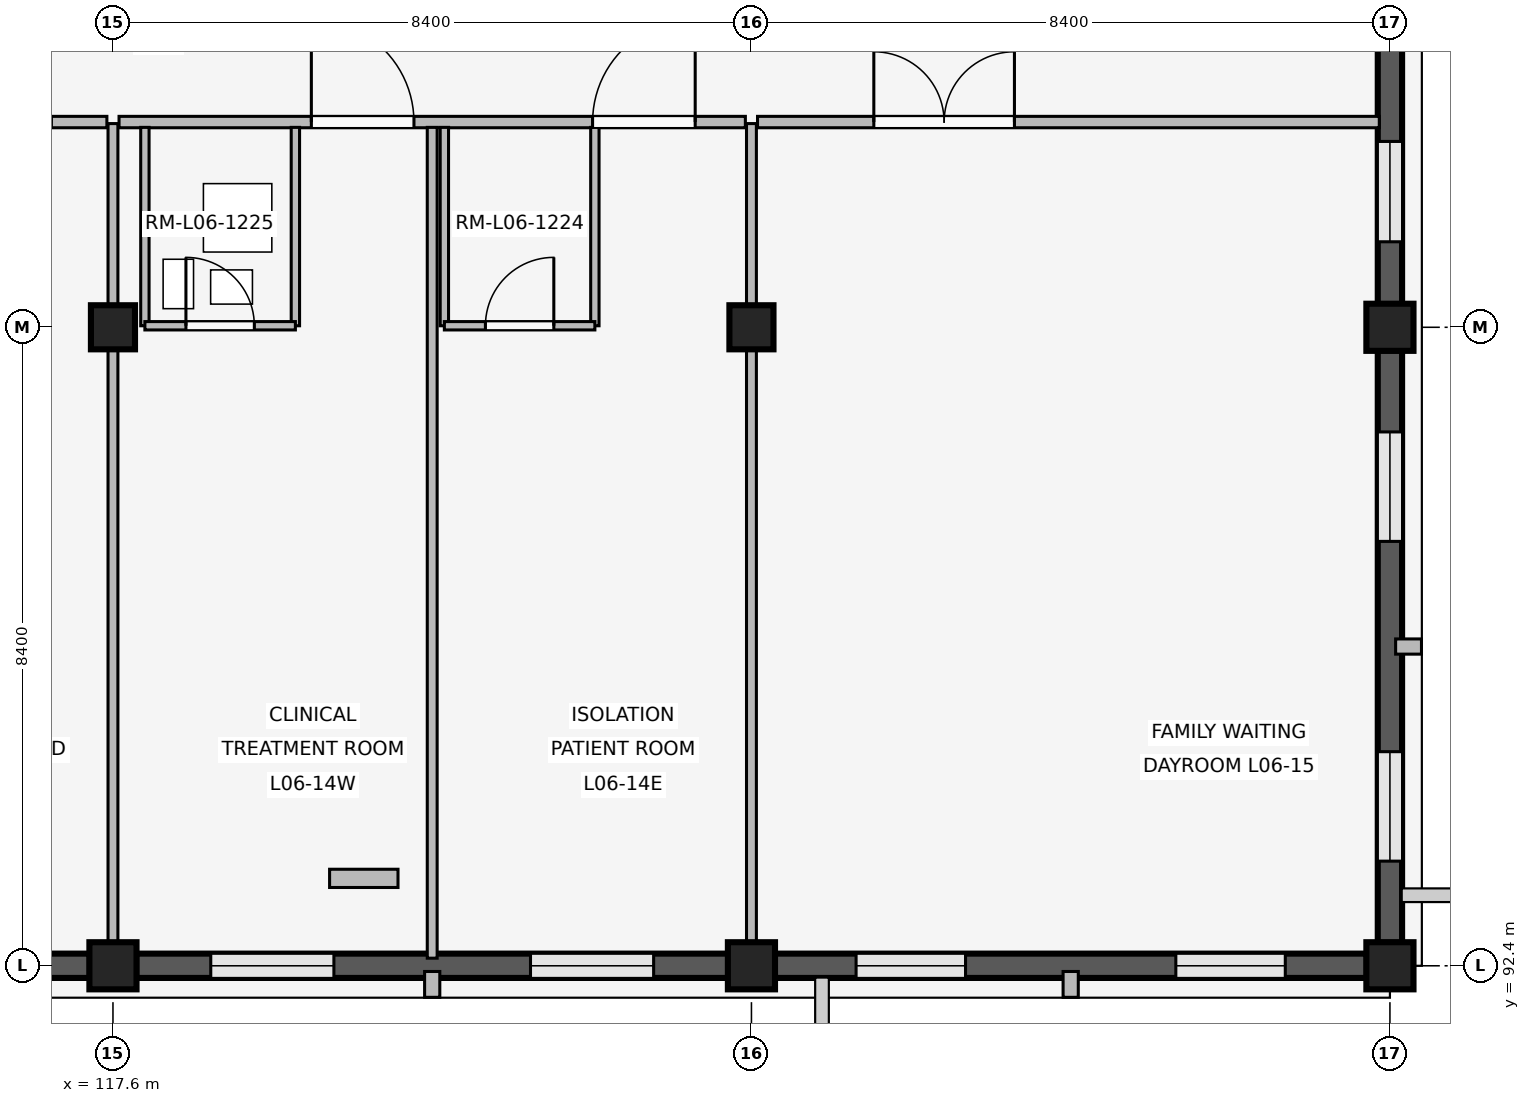
"""IFC4 building model, lengths in metres.
Left out: names, types, materials, properties, quantities, classifications, styles, units other than length and angle.
Written with IfcOpenShell. Run it as: python <this file> out.ifc"""

import sys

from ifc_helpers import new_model, si_unit, direction, frame, frame_2d, origin, origin_2d, place, context, subcontext, project, spatial, rectangle, extrude, element, fill, save


model = new_model("IFC4")
c1 = context("Model", 3, precision=1e-05, world=origin(), true_north=direction((0.0, 1.0)))
c2 = subcontext(c1, "Body", "Model", "MODEL_VIEW")
j1 = project(units=[si_unit("LENGTHUNIT", "METRE"), si_unit("PLANEANGLEUNIT", "RADIAN")], contexts=[c1])
p1 = place(None, origin())
s1 = spatial("IfcSite", under=j1, at=p1, CompositionType="ELEMENT")
p2 = place(p1, origin())
s2 = spatial("IfcBuilding", under=s1, at=p2, CompositionType="ELEMENT")
p3 = place(p2, frame((0.0, 0.0, 24.6)))
s3 = spatial("IfcBuildingStorey", under=s2, at=p3, CompositionType="ELEMENT", Elevation=24.6)
p4 = place(p3, frame((117.6, 92.4, 0.0), z_axis=(0.0, 0.0, 1.0), x_axis=(1.0, 0.0, 0.0)))
e1 = element("IfcColumn", 1, at=p4, inside=s3, PredefinedType="COLUMN", context=c2, shape_type="SweptSolid", body=[
    extrude(rectangle(XDim=0.62, YDim=0.62, at=origin_2d()), origin(), (0.0, 0.0, 1.0), 4.2),
])
p5 = place(p3, frame((117.6, 100.8, 0.0), z_axis=(0.0, 0.0, 1.0), x_axis=(1.0, 0.0, 0.0)))
e2 = element("IfcColumn", 2, at=p5, inside=s3, PredefinedType="COLUMN", context=c2, shape_type="SweptSolid", body=[
    extrude(rectangle(XDim=0.58, YDim=0.58, at=origin_2d()), origin(), (0.0, 0.0, 1.0), 4.2),
])
p6 = place(p3, frame((126.0, 92.4, 0.0), z_axis=(0.0, 0.0, 1.0), x_axis=(1.0, 0.0, 0.0)))
e3 = element("IfcColumn", 3, at=p6, inside=s3, PredefinedType="COLUMN", context=c2, shape_type="SweptSolid", body=[
    extrude(rectangle(XDim=0.62, YDim=0.62, at=origin_2d()), origin(), (0.0, 0.0, 1.0), 4.2),
])
p7 = place(p3, frame((126.0, 100.8, 0.0), z_axis=(0.0, 0.0, 1.0), x_axis=(1.0, 0.0, 0.0)))
e4 = element("IfcColumn", 4, at=p7, inside=s3, PredefinedType="COLUMN", context=c2, shape_type="SweptSolid", body=[
    extrude(rectangle(XDim=0.58, YDim=0.58, at=origin_2d()), origin(), (0.0, 0.0, 1.0), 4.2),
])
for number, where, z_axis, x_axis in (
    (5, (134.4, 92.4, 0.0), (0.0, 0.0, 1.0), (1.0, 0.0, 0.0)),
    (6, (134.4, 100.8, 0.0), (0.0, 0.0, 1.0), (1.0, 0.0, 0.0)),
):
    element("IfcColumn", number, at=place(p3, frame(where, z_axis=z_axis, x_axis=x_axis)), inside=s3, PredefinedType="COLUMN", context=c2, shape_type="SweptSolid", body=[
        extrude(rectangle(XDim=0.62, YDim=0.62, at=origin_2d()), origin(), (0.0, 0.0, 1.0), 4.2),
    ])
p8 = place(p3, frame((117.295, 92.4, 0.0), z_axis=(0.0, 0.0, 1.0), x_axis=(-1.0, 0.0, 0.0)))
e7 = element("IfcWall", 7, at=p8, inside=s3, PredefinedType="SOLIDWALL", context=c2, shape_type="SweptSolid", body=[
    extrude(rectangle(XDim=7.79, YDim=0.32, at=frame_2d((3.895, 0.0))), origin(), (0.0, 0.0, 1.0), 3.34),
])
p9 = place(p8, frame((1.012, 0.0, 0.85)))
e8 = element("IfcOpeningElement", 8, at=p9, cuts=e7, PredefinedType="OPENING", context=c2, shape_type="SweptSolid", body=[
    extrude(rectangle(XDim=1.56, YDim=1.7, at=frame_2d((0.78, 0.85))), frame((0.0, 0.17, 0.0), z_axis=(0.0, -1.0, 0.0), x_axis=(1.0, 0.0, 0.0)), (0.0, 0.0, 1.0), 0.34),
])
p10 = place(p8, frame((5.218, 0.0, 0.85)))
e9 = element("IfcOpeningElement", 9, at=p10, cuts=e7, PredefinedType="OPENING", context=c2, shape_type="SweptSolid", body=[
    extrude(rectangle(XDim=1.56, YDim=1.7, at=frame_2d((0.78, 0.85))), frame((0.0, 0.17, 0.0), z_axis=(0.0, -1.0, 0.0), x_axis=(1.0, 0.0, 0.0)), (0.0, 0.0, 1.0), 0.34),
])
p11 = place(p3, frame((125.695, 92.4, 0.0), z_axis=(0.0, 0.0, 1.0), x_axis=(-1.0, 0.0, 0.0)))
e10 = element("IfcWall", 10, at=p11, inside=s3, PredefinedType="SOLIDWALL", context=c2, shape_type="SweptSolid", body=[
    extrude(rectangle(XDim=7.79, YDim=0.32, at=frame_2d((3.895, 0.0))), origin(), (0.0, 0.0, 1.0), 3.34),
])
p12 = place(p11, frame((0.982, 0.0, 0.85)))
e11 = element("IfcOpeningElement", 11, at=p12, cuts=e10, PredefinedType="OPENING", context=c2, shape_type="SweptSolid", body=[
    extrude(rectangle(XDim=1.62, YDim=1.8, at=frame_2d((0.81, 0.9))), frame((0.0, 0.17, 0.0), z_axis=(0.0, -1.0, 0.0), x_axis=(1.0, 0.0, 0.0)), (0.0, 0.0, 1.0), 0.34),
])
p13 = place(p11, frame((5.188, 0.0, 0.85)))
e12 = element("IfcOpeningElement", 12, at=p13, cuts=e10, PredefinedType="OPENING", context=c2, shape_type="SweptSolid", body=[
    extrude(rectangle(XDim=1.62, YDim=1.8, at=frame_2d((0.81, 0.9))), frame((0.0, 0.17, 0.0), z_axis=(0.0, -1.0, 0.0), x_axis=(1.0, 0.0, 0.0)), (0.0, 0.0, 1.0), 0.34),
])
p14 = place(p3, frame((121.8, 92.325, 0.0), z_axis=(0.0, 0.0, 1.0), x_axis=(0.0, -1.0, 0.0)))
e13 = element("IfcWall", 13, at=p14, inside=s3, PredefinedType="ELEMENTEDWALL", context=c2, shape_type="SweptSolid", body=[
    extrude(rectangle(XDim=0.34, YDim=0.2, at=frame_2d((0.17, 0.0))), origin(), (0.0, 0.0, 1.0), 3.32),
])
p15 = place(p3, frame((134.095, 92.4, 0.0), z_axis=(0.0, 0.0, 1.0), x_axis=(-1.0, 0.0, 0.0)))
e14 = element("IfcWall", 14, at=p15, inside=s3, PredefinedType="SOLIDWALL", context=c2, shape_type="SweptSolid", body=[
    extrude(rectangle(XDim=7.79, YDim=0.32, at=frame_2d((3.895, 0.0))), origin(), (0.0, 0.0, 1.0), 3.34),
])
p16 = place(p15, frame((1.072, 0.0, 0.85)))
e15 = element("IfcOpeningElement", 15, at=p16, cuts=e14, PredefinedType="OPENING", context=c2, shape_type="SweptSolid", body=[
    extrude(rectangle(XDim=1.44, YDim=1.62, at=frame_2d((0.72, 0.81))), frame((0.0, 0.17, 0.0), z_axis=(0.0, -1.0, 0.0), x_axis=(1.0, 0.0, 0.0)), (0.0, 0.0, 1.0), 0.34),
])
p17 = place(p15, frame((5.278, 0.0, 0.85)))
e16 = element("IfcOpeningElement", 16, at=p17, cuts=e14, PredefinedType="OPENING", context=c2, shape_type="SweptSolid", body=[
    extrude(rectangle(XDim=1.44, YDim=1.62, at=frame_2d((0.72, 0.81))), frame((0.0, 0.17, 0.0), z_axis=(0.0, -1.0, 0.0), x_axis=(1.0, 0.0, 0.0)), (0.0, 0.0, 1.0), 0.34),
])
p18 = place(p3, frame((130.2, 92.325, 0.0), z_axis=(0.0, 0.0, 1.0), x_axis=(0.0, -1.0, 0.0)))
e17 = element("IfcWall", 17, at=p18, inside=s3, PredefinedType="ELEMENTEDWALL", context=c2, shape_type="SweptSolid", body=[
    extrude(rectangle(XDim=0.34, YDim=0.2, at=frame_2d((0.17, 0.0))), origin(), (0.0, 0.0, 1.0), 3.32),
])
p19 = place(p3, frame((134.4, 100.495, 0.0), z_axis=(0.0, 0.0, 1.0), x_axis=(0.0, -1.0, 0.0)))
e18 = element("IfcWall", 18, at=p19, inside=s3, PredefinedType="SOLIDWALL", context=c2, shape_type="SweptSolid", body=[
    extrude(rectangle(XDim=7.79, YDim=0.32, at=frame_2d((3.895, 0.0))), origin(), (0.0, 0.0, 1.0), 3.34),
])
p20 = place(p19, frame((1.072, 0.0, 0.85)))
e19 = element("IfcOpeningElement", 19, at=p20, cuts=e18, PredefinedType="OPENING", context=c2, shape_type="SweptSolid", body=[
    extrude(rectangle(XDim=1.44, YDim=1.62, at=frame_2d((0.72, 0.81))), frame((0.0, 0.17, 0.0), z_axis=(0.0, -1.0, 0.0), x_axis=(1.0, 0.0, 0.0)), (0.0, 0.0, 1.0), 0.34),
])
p21 = place(p19, frame((5.278, 0.0, 0.85)))
e20 = element("IfcOpeningElement", 20, at=p21, cuts=e18, PredefinedType="OPENING", context=c2, shape_type="SweptSolid", body=[
    extrude(rectangle(XDim=1.44, YDim=1.62, at=frame_2d((0.72, 0.81))), frame((0.0, 0.17, 0.0), z_axis=(0.0, -1.0, 0.0), x_axis=(1.0, 0.0, 0.0)), (0.0, 0.0, 1.0), 0.34),
])
p22 = place(p3, frame((134.475, 96.6, 0.0), z_axis=(0.0, 0.0, 1.0), x_axis=(1.0, 0.0, 0.0)))
e21 = element("IfcWall", 21, at=p22, inside=s3, PredefinedType="ELEMENTEDWALL", context=c2, shape_type="SweptSolid", body=[
    extrude(rectangle(XDim=0.34, YDim=0.2, at=frame_2d((0.17, 0.0))), origin(), (0.0, 0.0, 1.0), 3.32),
])
p23 = place(p3, frame((134.4, 108.895, 0.0), z_axis=(0.0, 0.0, 1.0), x_axis=(0.0, -1.0, 0.0)))
e22 = element("IfcWall", 22, at=p23, inside=s3, PredefinedType="SOLIDWALL", context=c2, shape_type="SweptSolid", body=[
    extrude(rectangle(XDim=7.79, YDim=0.32, at=frame_2d((3.895, 0.0))), origin(), (0.0, 0.0, 1.0), 3.34),
])
p24 = place(p23, frame((0.82, 0.0, 0.85)))
e23 = element("IfcOpeningElement", 23, at=p24, cuts=e22, PredefinedType="OPENING", context=c2, shape_type="SweptSolid", body=[
    extrude(rectangle(XDim=1.32, YDim=1.58, at=frame_2d((0.66, 0.79))), frame((0.0, 0.17, 0.0), z_axis=(0.0, -1.0, 0.0), x_axis=(1.0, 0.0, 0.0)), (0.0, 0.0, 1.0), 0.34),
])
p25 = place(p23, frame((5.65, 0.0, 0.85)))
e24 = element("IfcOpeningElement", 24, at=p25, cuts=e22, PredefinedType="OPENING", context=c2, shape_type="SweptSolid", body=[
    extrude(rectangle(XDim=1.32, YDim=1.58, at=frame_2d((0.66, 0.79))), frame((0.0, 0.17, 0.0), z_axis=(0.0, -1.0, 0.0), x_axis=(1.0, 0.0, 0.0)), (0.0, 0.0, 1.0), 0.34),
])
p26 = place(p3, frame((109.28, 103.5, 0.0), z_axis=(0.0, 0.0, 1.0), x_axis=(1.0, 0.0, 0.0)))
e25 = element("IfcWall", 25, at=p26, inside=s3, PredefinedType="PARTITIONING", context=c2, shape_type="SweptSolid", body=[
    extrude(rectangle(XDim=8.24, YDim=0.15, at=frame_2d((4.12, 0.0))), origin(), (0.0, 0.0, 1.0), 3.32),
])
p27 = place(p26, frame((2.53, 0.0, 0.0)))
e26 = element("IfcOpeningElement", 26, at=p27, cuts=e25, PredefinedType="OPENING", context=c2, shape_type="SweptSolid", body=[
    extrude(rectangle(XDim=1.28, YDim=2.2, at=frame_2d((0.64, 1.1))), frame((0.0, 0.085, 0.0), z_axis=(0.0, -1.0, 0.0), x_axis=(1.0, 0.0, 0.0)), (0.0, 0.0, 1.0), 0.17),
])
p28 = place(p26, frame((6.23, 0.0, 0.0)))
e27 = element("IfcOpeningElement", 27, at=p28, cuts=e25, PredefinedType="OPENING", context=c2, shape_type="SweptSolid", body=[
    extrude(rectangle(XDim=1.28, YDim=2.2, at=frame_2d((0.64, 1.1))), frame((0.0, 0.085, 0.0), z_axis=(0.0, -1.0, 0.0), x_axis=(1.0, 0.0, 0.0)), (0.0, 0.0, 1.0), 0.17),
])
p29 = place(p3, frame((117.6, 92.54, 0.0), z_axis=(0.0, 0.0, 1.0), x_axis=(0.0, 1.0, 0.0)))
e28 = element("IfcWall", 28, at=p29, inside=s3, PredefinedType="PARTITIONING", context=c2, shape_type="SweptSolid", body=[
    extrude(rectangle(XDim=10.94, YDim=0.13, at=frame_2d((5.47, 0.0))), origin(), (0.0, 0.0, 1.0), 3.32),
])
p30 = place(p3, frame((117.68, 103.5, 0.0), z_axis=(0.0, 0.0, 1.0), x_axis=(1.0, 0.0, 0.0)))
e29 = element("IfcWall", 29, at=p30, inside=s3, PredefinedType="PARTITIONING", context=c2, shape_type="SweptSolid", body=[
    extrude(rectangle(XDim=8.24, YDim=0.15, at=frame_2d((4.12, 0.0))), origin(), (0.0, 0.0, 1.0), 3.32),
])
p31 = place(p30, frame((2.53, 0.0, 0.0)))
e30 = element("IfcOpeningElement", 30, at=p31, cuts=e29, PredefinedType="OPENING", context=c2, shape_type="SweptSolid", body=[
    extrude(rectangle(XDim=1.35, YDim=2.25, at=frame_2d((0.675, 1.125))), frame((0.0, 0.085, 0.0), z_axis=(0.0, -1.0, 0.0), x_axis=(1.0, 0.0, 0.0)), (0.0, 0.0, 1.0), 0.17),
])
p32 = place(p30, frame((6.23, 0.0, 0.0)))
e31 = element("IfcOpeningElement", 31, at=p32, cuts=e29, PredefinedType="OPENING", context=c2, shape_type="SweptSolid", body=[
    extrude(rectangle(XDim=1.35, YDim=2.25, at=frame_2d((0.675, 1.125))), frame((0.0, 0.085, 0.0), z_axis=(0.0, -1.0, 0.0), x_axis=(1.0, 0.0, 0.0)), (0.0, 0.0, 1.0), 0.17),
])
p33 = place(p3, frame((121.8, 92.5, 0.0), z_axis=(0.0, 0.0, 1.0), x_axis=(0.0, 1.0, 0.0)))
e32 = element("IfcWall", 32, at=p33, inside=s3, PredefinedType="PARTITIONING", context=c2, shape_type="SweptSolid", body=[
    extrude(rectangle(XDim=10.93, YDim=0.13, at=frame_2d((5.465, 0.0))), origin(), (0.0, 0.0, 1.0), 3.32),
])
for number, where, z_axis, x_axis in (
    (33, (118.02, 100.82, 0.0), (0.0, 0.0, 1.0), (0.0, 1.0, 0.0)),
    (34, (120.0, 100.82, 0.0), (0.0, 0.0, 1.0), (0.0, 1.0, 0.0)),
):
    element("IfcWall", number, at=place(p3, frame(where, z_axis=z_axis, x_axis=x_axis)), inside=s3, PredefinedType="PARTITIONING", context=c2, shape_type="SweptSolid", body=[
        extrude(rectangle(XDim=2.61, YDim=0.11, at=frame_2d((1.305, 0.0))), origin(), (0.0, 0.0, 1.0), 3.32),
    ])
p34 = place(p3, frame((118.02, 100.82, 0.0), z_axis=(0.0, 0.0, 1.0), x_axis=(1.0, 0.0, 0.0)))
e35 = element("IfcWall", 35, at=p34, inside=s3, PredefinedType="PARTITIONING", context=c2, shape_type="SweptSolid", body=[
    extrude(rectangle(XDim=1.98, YDim=0.11, at=frame_2d((0.99, 0.0))), origin(), (0.0, 0.0, 1.0), 3.32),
])
p35 = place(p34, frame((0.54, 0.0, 0.0)))
e36 = element("IfcOpeningElement", 36, at=p35, cuts=e35, PredefinedType="OPENING", context=c2, shape_type="SweptSolid", body=[
    extrude(rectangle(XDim=0.9, YDim=2.1, at=frame_2d((0.45, 1.05))), frame((0.0, 0.065, 0.0), z_axis=(0.0, -1.0, 0.0), x_axis=(1.0, 0.0, 0.0)), (0.0, 0.0, 1.0), 0.13),
])
for number, where, z_axis, x_axis in (
    (37, (121.96, 100.82, 0.0), (0.0, 0.0, 1.0), (0.0, 1.0, 0.0)),
    (38, (123.94, 100.82, 0.0), (0.0, 0.0, 1.0), (0.0, 1.0, 0.0)),
):
    element("IfcWall", number, at=place(p3, frame(where, z_axis=z_axis, x_axis=x_axis)), inside=s3, PredefinedType="PARTITIONING", context=c2, shape_type="SweptSolid", body=[
        extrude(rectangle(XDim=2.61, YDim=0.11, at=frame_2d((1.305, 0.0))), origin(), (0.0, 0.0, 1.0), 3.32),
    ])
p36 = place(p3, frame((121.96, 100.82, 0.0), z_axis=(0.0, 0.0, 1.0), x_axis=(1.0, 0.0, 0.0)))
e39 = element("IfcWall", 39, at=p36, inside=s3, PredefinedType="PARTITIONING", context=c2, shape_type="SweptSolid", body=[
    extrude(rectangle(XDim=1.98, YDim=0.11, at=frame_2d((0.99, 0.0))), origin(), (0.0, 0.0, 1.0), 3.32),
])
p37 = place(p36, frame((0.54, 0.0, 0.0)))
e40 = element("IfcOpeningElement", 40, at=p37, cuts=e39, PredefinedType="OPENING", context=c2, shape_type="SweptSolid", body=[
    extrude(rectangle(XDim=0.9, YDim=2.1, at=frame_2d((0.45, 1.05))), frame((0.0, 0.065, 0.0), z_axis=(0.0, -1.0, 0.0), x_axis=(1.0, 0.0, 0.0)), (0.0, 0.0, 1.0), 0.13),
])
p38 = place(p3, frame((120.45, 93.55, 0.0), z_axis=(0.0, 0.0, 1.0), x_axis=(1.0, 0.0, 0.0)))
e41 = element("IfcWall", 41, at=p38, inside=s3, PredefinedType="PLUMBINGWALL", context=c2, shape_type="SweptSolid", body=[
    extrude(rectangle(XDim=0.9, YDim=0.24, at=frame_2d((0.45, 0.0))), origin(), (0.0, 0.0, 1.0), 3.32),
])
p39 = place(p3, frame((126.0, 92.54, 0.0), z_axis=(0.0, 0.0, 1.0), x_axis=(0.0, 1.0, 0.0)))
e42 = element("IfcWall", 42, at=p39, inside=s3, PredefinedType="PARTITIONING", context=c2, shape_type="SweptSolid", body=[
    extrude(rectangle(XDim=10.94, YDim=0.13, at=frame_2d((5.47, 0.0))), origin(), (0.0, 0.0, 1.0), 3.32),
])
p40 = place(p3, frame((126.08, 103.5, 0.0), z_axis=(0.0, 0.0, 1.0), x_axis=(1.0, 0.0, 0.0)))
e43 = element("IfcWall", 43, at=p40, inside=s3, PredefinedType="PARTITIONING", context=c2, shape_type="SweptSolid", body=[
    extrude(rectangle(XDim=8.18, YDim=0.15, at=frame_2d((4.09, 0.0))), origin(), (0.0, 0.0, 1.0), 3.32),
])
p41 = place(p40, frame((1.53, 0.0, 0.0)))
e44 = element("IfcOpeningElement", 44, at=p41, cuts=e43, PredefinedType="OPENING", context=c2, shape_type="SweptSolid", body=[
    extrude(rectangle(XDim=1.85, YDim=2.3, at=frame_2d((0.925, 1.15))), frame((0.0, 0.085, 0.0), z_axis=(0.0, -1.0, 0.0), x_axis=(1.0, 0.0, 0.0)), (0.0, 0.0, 1.0), 0.17),
])
p42 = place(p12, origin())
e45 = element("IfcWindow", 45, at=p42, inside=s3, PartitioningType="SINGLE_PANEL", PredefinedType="WINDOW", context=c2, shape_type="SweptSolid", body=[
    extrude(rectangle(XDim=1.62, YDim=1.8, at=frame_2d((0.81, 0.9))), frame((0.0, 0.03, 0.0), z_axis=(0.0, -1.0, 0.0), x_axis=(1.0, 0.0, 0.0)), (0.0, 0.0, 1.0), 0.06),
])
fill(e11, e45)
p43 = place(p13, origin())
e46 = element("IfcWindow", 46, at=p43, inside=s3, PartitioningType="SINGLE_PANEL", PredefinedType="WINDOW", context=c2, shape_type="SweptSolid", body=[
    extrude(rectangle(XDim=1.62, YDim=1.8, at=frame_2d((0.81, 0.9))), frame((0.0, 0.03, 0.0), z_axis=(0.0, -1.0, 0.0), x_axis=(1.0, 0.0, 0.0)), (0.0, 0.0, 1.0), 0.06),
])
fill(e12, e46)
p44 = place(p16, origin())
e47 = element("IfcWindow", 47, at=p44, inside=s3, PartitioningType="SINGLE_PANEL", PredefinedType="WINDOW", context=c2, shape_type="SweptSolid", body=[
    extrude(rectangle(XDim=1.44, YDim=1.62, at=frame_2d((0.72, 0.81))), frame((0.0, 0.03, 0.0), z_axis=(0.0, -1.0, 0.0), x_axis=(1.0, 0.0, 0.0)), (0.0, 0.0, 1.0), 0.06),
])
fill(e15, e47)
p45 = place(p17, origin())
e48 = element("IfcWindow", 48, at=p45, inside=s3, PartitioningType="SINGLE_PANEL", PredefinedType="WINDOW", context=c2, shape_type="SweptSolid", body=[
    extrude(rectangle(XDim=1.44, YDim=1.62, at=frame_2d((0.72, 0.81))), frame((0.0, 0.03, 0.0), z_axis=(0.0, -1.0, 0.0), x_axis=(1.0, 0.0, 0.0)), (0.0, 0.0, 1.0), 0.06),
])
fill(e16, e48)
p46 = place(p20, origin())
e49 = element("IfcWindow", 49, at=p46, inside=s3, PartitioningType="SINGLE_PANEL", PredefinedType="WINDOW", context=c2, shape_type="SweptSolid", body=[
    extrude(rectangle(XDim=1.44, YDim=1.62, at=frame_2d((0.72, 0.81))), frame((0.0, 0.03, 0.0), z_axis=(0.0, -1.0, 0.0), x_axis=(1.0, 0.0, 0.0)), (0.0, 0.0, 1.0), 0.06),
])
fill(e19, e49)
p47 = place(p21, origin())
e50 = element("IfcWindow", 50, at=p47, inside=s3, PartitioningType="SINGLE_PANEL", PredefinedType="WINDOW", context=c2, shape_type="SweptSolid", body=[
    extrude(rectangle(XDim=1.44, YDim=1.62, at=frame_2d((0.72, 0.81))), frame((0.0, 0.03, 0.0), z_axis=(0.0, -1.0, 0.0), x_axis=(1.0, 0.0, 0.0)), (0.0, 0.0, 1.0), 0.06),
])
fill(e20, e50)
p48 = place(p25, origin())
e51 = element("IfcWindow", 51, at=p48, inside=s3, PartitioningType="SINGLE_PANEL", PredefinedType="WINDOW", context=c2, shape_type="SweptSolid", body=[
    extrude(rectangle(XDim=1.32, YDim=1.58, at=frame_2d((0.66, 0.79))), frame((0.0, 0.03, 0.0), z_axis=(0.0, -1.0, 0.0), x_axis=(1.0, 0.0, 0.0)), (0.0, 0.0, 1.0), 0.06),
])
fill(e24, e51)
p49 = place(p31, origin())
e52 = element("IfcDoor", 52, at=p49, inside=s3, OperationType="SINGLE_SWING_LEFT", PredefinedType="DOOR", context=c2, shape_type="SweptSolid", body=[
    extrude(rectangle(XDim=1.35, YDim=2.25, at=frame_2d((0.675, 1.125))), frame((0.0, 0.025, 0.0), z_axis=(0.0, -1.0, 0.0), x_axis=(1.0, 0.0, 0.0)), (0.0, 0.0, 1.0), 0.05),
])
fill(e30, e52)
p50 = place(p32, origin())
e53 = element("IfcDoor", 53, at=p50, inside=s3, OperationType="SINGLE_SWING_RIGHT", PredefinedType="DOOR", context=c2, shape_type="SweptSolid", body=[
    extrude(rectangle(XDim=1.35, YDim=2.25, at=frame_2d((0.675, 1.125))), frame((0.0, 0.025, 0.0), z_axis=(0.0, -1.0, 0.0), x_axis=(1.0, 0.0, 0.0)), (0.0, 0.0, 1.0), 0.05),
])
fill(e31, e53)
p51 = place(p35, origin())
e54 = element("IfcDoor", 54, at=p51, inside=s3, OperationType="SINGLE_SWING_LEFT", PredefinedType="DOOR", context=c2, shape_type="SweptSolid", body=[
    extrude(rectangle(XDim=0.9, YDim=2.1, at=frame_2d((0.45, 1.05))), frame((0.0, 0.025, 0.0), z_axis=(0.0, -1.0, 0.0), x_axis=(1.0, 0.0, 0.0)), (0.0, 0.0, 1.0), 0.05),
])
fill(e36, e54)
p52 = place(p37, origin())
e55 = element("IfcDoor", 55, at=p52, inside=s3, OperationType="SINGLE_SWING_RIGHT", PredefinedType="DOOR", context=c2, shape_type="SweptSolid", body=[
    extrude(rectangle(XDim=0.9, YDim=2.1, at=frame_2d((0.45, 1.05))), frame((0.0, 0.025, 0.0), z_axis=(0.0, -1.0, 0.0), x_axis=(1.0, 0.0, 0.0)), (0.0, 0.0, 1.0), 0.05),
])
fill(e40, e55)
p53 = place(p41, origin())
e56 = element("IfcDoor", 56, at=p53, inside=s3, OperationType="DOUBLE_SWING_LEFT", PredefinedType="DOOR", context=c2, shape_type="SweptSolid", body=[
    extrude(rectangle(XDim=1.85, YDim=2.3, at=frame_2d((0.925, 1.15))), frame((0.0, 0.025, 0.0), z_axis=(0.0, -1.0, 0.0), x_axis=(1.0, 0.0, 0.0)), (0.0, 0.0, 1.0), 0.05),
])
fill(e44, e56)
save(model, sys.argv[1])
